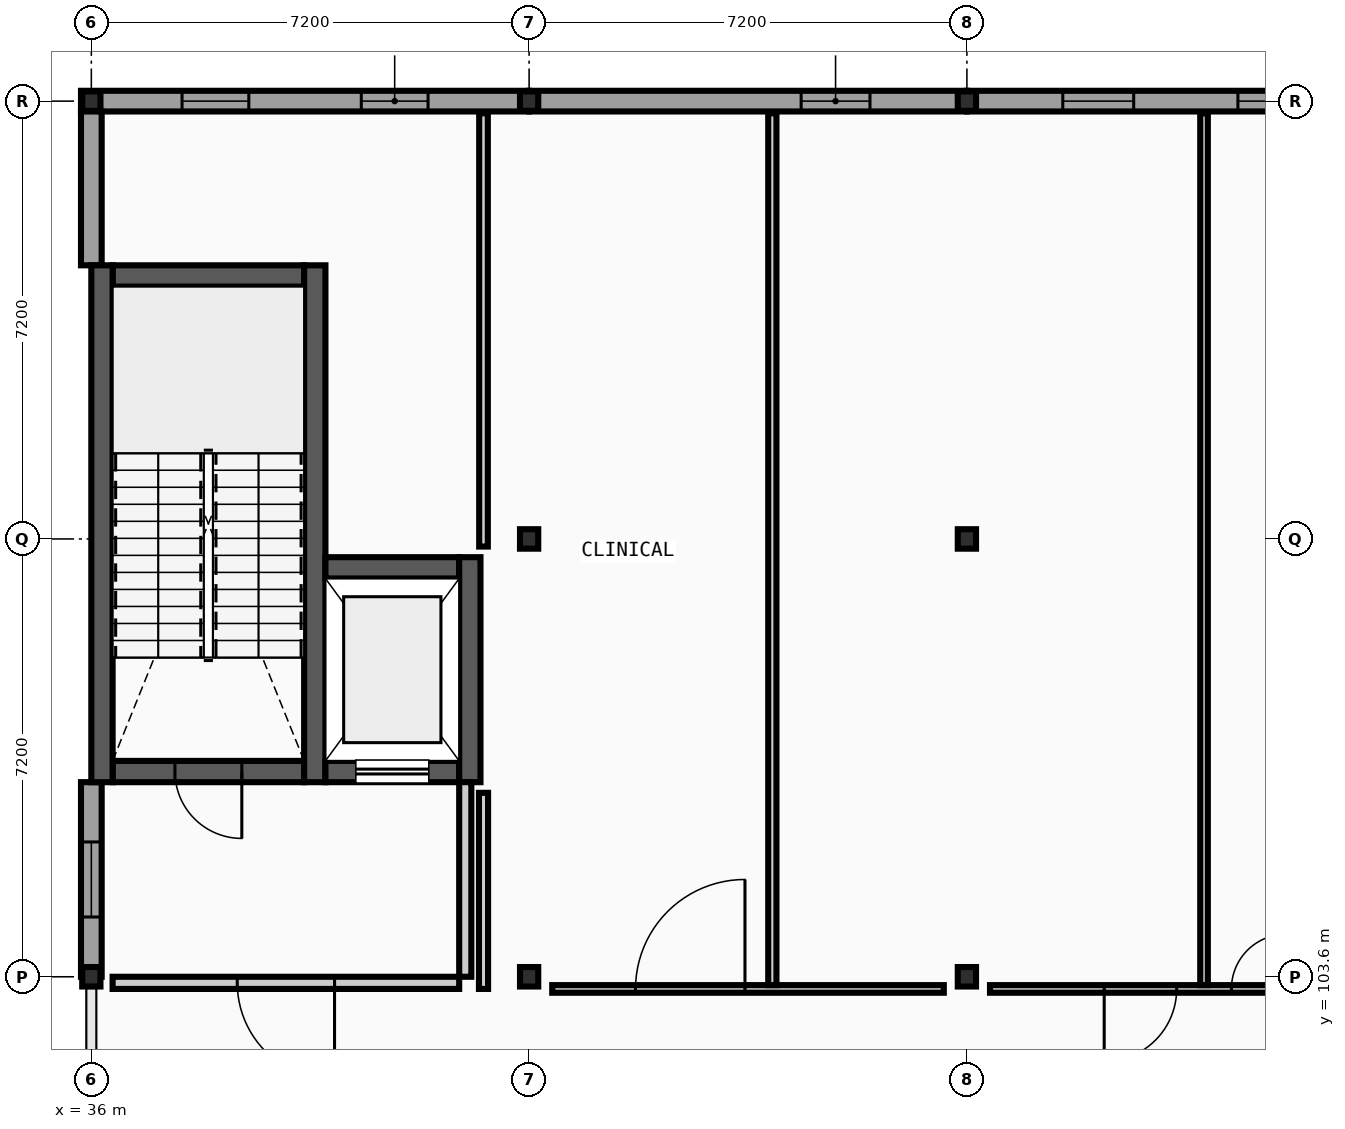
"""IFC4 building model, lengths in metres.
Left out: names, types, materials, properties, quantities, classifications, styles, units other than length and angle.
Written with IfcOpenShell. Run it as: python <this file> out.ifc"""

import sys

from ifc_helpers import new_model, si_unit, direction, frame, frame_2d, origin, origin_2d, place, context, subcontext, project, spatial, rectangle, i_section, extrude, element, fill, save


model = new_model("IFC4")
c1 = context("Model", 3, precision=1e-05, world=origin(), true_north=direction((0.0, 1.0)))
c2 = subcontext(c1, "Body", "Model", "MODEL_VIEW")
j1 = project(units=[si_unit("LENGTHUNIT", "METRE"), si_unit("PLANEANGLEUNIT", "RADIAN")], contexts=[c1])
p1 = place(None, origin())
s1 = spatial("IfcSite", under=j1, at=p1, CompositionType="ELEMENT")
p2 = place(p1, origin())
s2 = spatial("IfcBuilding", under=s1, at=p2, CompositionType="ELEMENT")
p3 = place(p2, frame((0.0, 0.0, 18.4)))
s3 = spatial("IfcBuildingStorey", under=s2, at=p3, CompositionType="ELEMENT", Elevation=18.4)
for number, where, z_axis, x_axis in (
    (1, (36.0, 103.6, 0.0), (0.0, 0.0, 1.0), (1.0, 0.0, 0.0)),
    (2, (36.0, 118.0, 0.0), (0.0, 0.0, 1.0), (1.0, 0.0, 0.0)),
    (3, (43.2, 103.6, 0.0), (0.0, 0.0, 1.0), (1.0, 0.0, 0.0)),
    (4, (43.2, 110.8, 0.0), (0.0, 0.0, 1.0), (1.0, 0.0, 0.0)),
    (5, (43.2, 118.0, 0.0), (0.0, 0.0, 1.0), (1.0, 0.0, 0.0)),
    (6, (50.4, 103.6, 0.0), (0.0, 0.0, 1.0), (1.0, 0.0, 0.0)),
    (7, (50.4, 110.8, 0.0), (0.0, 0.0, 1.0), (1.0, 0.0, 0.0)),
    (8, (50.4, 118.0, 0.0), (0.0, 0.0, 1.0), (1.0, 0.0, 0.0)),
):
    element("IfcColumn", number, at=place(p3, frame(where, z_axis=z_axis, x_axis=x_axis)), inside=s3, PredefinedType="COLUMN", context=c2, shape_type="SweptSolid", body=[
        extrude(i_section(OverallWidth=0.3, OverallDepth=0.32, WebThickness=0.011, FlangeThickness=0.021, FilletRadius=0.027, at=origin_2d()), origin(), (0.0, 0.0, 1.0), 4.4),
    ])
p4 = place(p3, frame((43.2, 118.0, 0.0), z_axis=(0.0, 0.0, 1.0), x_axis=(-1.0, 0.0, 0.0)))
e9 = element("IfcWall", 9, at=p4, inside=s3, PredefinedType="STANDARD", context=c2, shape_type="SweptSolid", body=[
    extrude(rectangle(XDim=7.37, YDim=0.34, at=frame_2d((3.685, 0.0))), origin(), (0.0, 0.0, 1.0), 3.95),
])
p5 = place(p4, frame((1.662, 0.0, 0.95)))
e10 = element("IfcOpeningElement", 10, at=p5, cuts=e9, PredefinedType="OPENING", context=c2, shape_type="SweptSolid", body=[
    extrude(rectangle(XDim=1.098, YDim=1.26, at=frame_2d((0.549, 0.63))), frame((0.0, 0.18, 0.0), z_axis=(0.0, -1.0, 0.0), x_axis=(1.0, 0.0, 0.0)), (0.0, 0.0, 1.0), 0.36),
])
p6 = place(p4, frame((4.61, 0.0, 0.95)))
e11 = element("IfcOpeningElement", 11, at=p6, cuts=e9, PredefinedType="OPENING", context=c2, shape_type="SweptSolid", body=[
    extrude(rectangle(XDim=1.098, YDim=1.26, at=frame_2d((0.549, 0.63))), frame((0.0, 0.18, 0.0), z_axis=(0.0, -1.0, 0.0), x_axis=(1.0, 0.0, 0.0)), (0.0, 0.0, 1.0), 0.36),
])
p7 = place(p3, frame((50.4, 118.0, 0.0), z_axis=(0.0, 0.0, 1.0), x_axis=(-1.0, 0.0, 0.0)))
e12 = element("IfcWall", 12, at=p7, inside=s3, PredefinedType="STANDARD", context=c2, shape_type="SweptSolid", body=[
    extrude(rectangle(XDim=7.2, YDim=0.34, at=frame_2d((3.6, 0.0))), origin(), (0.0, 0.0, 1.0), 3.95),
])
p8 = place(p7, frame((1.594, 0.0, 0.95)))
e13 = element("IfcOpeningElement", 13, at=p8, cuts=e12, PredefinedType="OPENING", context=c2, shape_type="SweptSolid", body=[
    extrude(rectangle(XDim=1.132, YDim=1.26, at=frame_2d((0.566, 0.63))), frame((0.0, 0.18, 0.0), z_axis=(0.0, -1.0, 0.0), x_axis=(1.0, 0.0, 0.0)), (0.0, 0.0, 1.0), 0.36),
])
p9 = place(p3, frame((57.6, 118.0, 0.0), z_axis=(0.0, 0.0, 1.0), x_axis=(-1.0, 0.0, 0.0)))
e14 = element("IfcWall", 14, at=p9, inside=s3, PredefinedType="STANDARD", context=c2, shape_type="SweptSolid", body=[
    extrude(rectangle(XDim=7.2, YDim=0.34, at=frame_2d((3.6, 0.0))), origin(), (0.0, 0.0, 1.0), 3.95),
])
p10 = place(p9, frame((1.577, 0.0, 0.95)))
e15 = element("IfcOpeningElement", 15, at=p10, cuts=e14, PredefinedType="OPENING", context=c2, shape_type="SweptSolid", body=[
    extrude(rectangle(XDim=1.166, YDim=1.26, at=frame_2d((0.583, 0.63))), frame((0.0, 0.18, 0.0), z_axis=(0.0, -1.0, 0.0), x_axis=(1.0, 0.0, 0.0)), (0.0, 0.0, 1.0), 0.36),
])
p11 = place(p9, frame((4.457, 0.0, 0.95)))
e16 = element("IfcOpeningElement", 16, at=p11, cuts=e14, PredefinedType="OPENING", context=c2, shape_type="SweptSolid", body=[
    extrude(rectangle(XDim=1.166, YDim=1.26, at=frame_2d((0.583, 0.63))), frame((0.0, 0.18, 0.0), z_axis=(0.0, -1.0, 0.0), x_axis=(1.0, 0.0, 0.0)), (0.0, 0.0, 1.0), 0.36),
])
p12 = place(p3, frame((36.0, 106.8, 0.0), z_axis=(0.0, 0.0, 1.0), x_axis=(0.0, -1.0, 0.0)))
e17 = element("IfcWall", 17, at=p12, inside=s3, PredefinedType="STANDARD", context=c2, shape_type="SweptSolid", body=[
    extrude(rectangle(XDim=3.2, YDim=0.34, at=frame_2d((1.6, 0.0))), origin(), (0.0, 0.0, 1.0), 4.215),
])
p13 = place(p12, frame((0.983, 0.0, 0.95)))
e18 = element("IfcOpeningElement", 18, at=p13, cuts=e17, PredefinedType="OPENING", context=c2, shape_type="SweptSolid", body=[
    extrude(rectangle(XDim=1.234, YDim=1.26, at=frame_2d((0.617, 0.63))), frame((0.0, 0.18, 0.0), z_axis=(0.0, -1.0, 0.0), x_axis=(1.0, 0.0, 0.0)), (0.0, 0.0, 1.0), 0.36),
])
p14 = place(p3, frame((36.0, 117.83, 0.0), z_axis=(0.0, 0.0, 1.0), x_axis=(0.0, -1.0, 0.0)))
e19 = element("IfcWall", 19, at=p14, inside=s3, PredefinedType="STANDARD", context=c2, shape_type="SweptSolid", body=[
    extrude(rectangle(XDim=2.53, YDim=0.34, at=frame_2d((1.265, 0.0))), origin(), (0.0, 0.0, 1.0), 4.215),
])
p15 = place(p3, frame((36.35, 106.975, 0.0), z_axis=(0.0, 0.0, 1.0), x_axis=(1.0, 0.0, 0.0)))
e20 = element("IfcWall", 20, at=p15, inside=s3, PredefinedType="SHEAR", context=c2, shape_type="SweptSolid", body=[
    extrude(rectangle(XDim=3.15, YDim=0.35, at=frame_2d((1.575, 0.0))), origin(), (0.0, 0.0, 1.0), 4.215),
])
p16 = place(p15, frame((1.025, 0.0, 0.0)))
e21 = element("IfcOpeningElement", 21, at=p16, cuts=e20, PredefinedType="OPENING", context=c2, shape_type="SweptSolid", body=[
    extrude(rectangle(XDim=1.1, YDim=2.15, at=frame_2d((0.55, 1.075))), frame((0.0, 0.185, 0.0), z_axis=(0.0, -1.0, 0.0), x_axis=(1.0, 0.0, 0.0)), (0.0, 0.0, 1.0), 0.37),
])
p17 = place(p3, frame((36.35, 115.125, 0.0), z_axis=(0.0, 0.0, 1.0), x_axis=(1.0, 0.0, 0.0)))
e22 = element("IfcWall", 22, at=p17, inside=s3, PredefinedType="SHEAR", context=c2, shape_type="SweptSolid", body=[
    extrude(rectangle(XDim=3.15, YDim=0.35, at=frame_2d((1.575, 0.0))), origin(), (0.0, 0.0, 1.0), 4.215),
])
for number, where, z_axis, x_axis in (
    (23, (36.175, 106.8, 0.0), (0.0, 0.0, 1.0), (0.0, 1.0, 0.0)),
    (24, (39.675, 106.8, 0.0), (0.0, 0.0, 1.0), (0.0, 1.0, 0.0)),
):
    element("IfcWall", number, at=place(p3, frame(where, z_axis=z_axis, x_axis=x_axis)), inside=s3, PredefinedType="SHEAR", context=c2, shape_type="SweptSolid", body=[
        extrude(rectangle(XDim=8.5, YDim=0.35, at=frame_2d((4.25, 0.0))), origin(), (0.0, 0.0, 1.0), 4.215),
    ])
p18 = place(p3, frame((39.85, 106.975, 0.0), z_axis=(0.0, 0.0, 1.0), x_axis=(1.0, 0.0, 0.0)))
e25 = element("IfcWall", 25, at=p18, inside=s3, PredefinedType="SHEAR", context=c2, shape_type="SweptSolid", body=[
    extrude(rectangle(XDim=2.2, YDim=0.35, at=frame_2d((1.1, 0.0))), origin(), (0.0, 0.0, 1.0), 4.215),
])
p19 = place(p18, frame((0.5, 0.0, 0.0)))
e26 = element("IfcOpeningElement", 26, at=p19, cuts=e25, PredefinedType="OPENING", context=c2, shape_type="SweptSolid", body=[
    extrude(rectangle(XDim=1.2, YDim=2.2, at=frame_2d((0.6, 1.1))), frame((0.0, 0.185, 0.0), z_axis=(0.0, -1.0, 0.0), x_axis=(1.0, 0.0, 0.0)), (0.0, 0.0, 1.0), 0.37),
])
p20 = place(p3, frame((39.85, 110.325, 0.0), z_axis=(0.0, 0.0, 1.0), x_axis=(1.0, 0.0, 0.0)))
e27 = element("IfcWall", 27, at=p20, inside=s3, PredefinedType="SHEAR", context=c2, shape_type="SweptSolid", body=[
    extrude(rectangle(XDim=2.2, YDim=0.35, at=frame_2d((1.1, 0.0))), origin(), (0.0, 0.0, 1.0), 4.215),
])
p21 = place(p3, frame((42.225, 106.8, 0.0), z_axis=(0.0, 0.0, 1.0), x_axis=(0.0, 1.0, 0.0)))
e28 = element("IfcWall", 28, at=p21, inside=s3, PredefinedType="SHEAR", context=c2, shape_type="SweptSolid", body=[
    extrude(rectangle(XDim=3.7, YDim=0.35, at=frame_2d((1.85, 0.0))), origin(), (0.0, 0.0, 1.0), 4.215),
])
p22 = place(p3, frame((36.35, 103.5, 0.0), z_axis=(0.0, 0.0, 1.0), x_axis=(1.0, 0.0, 0.0)))
e29 = element("IfcWall", 29, at=p22, inside=s3, PredefinedType="PARTITIONING", context=c2, shape_type="SweptSolid", body=[
    extrude(rectangle(XDim=5.7, YDim=0.2, at=frame_2d((2.85, 0.0))), origin(), (0.0, 0.0, 1.0), 3.95),
])
p23 = place(p22, frame((2.05, 0.0, 0.0)))
e30 = element("IfcOpeningElement", 30, at=p23, cuts=e29, PredefinedType="OPENING", context=c2, shape_type="SweptSolid", body=[
    extrude(rectangle(XDim=1.6, YDim=2.2, at=frame_2d((0.8, 1.1))), frame((0.0, 0.11, 0.0), z_axis=(0.0, -1.0, 0.0), x_axis=(1.0, 0.0, 0.0)), (0.0, 0.0, 1.0), 0.22),
])
p24 = place(p3, frame((42.15, 103.6, 0.0), z_axis=(0.0, 0.0, 1.0), x_axis=(0.0, 1.0, 0.0)))
e31 = element("IfcWall", 31, at=p24, inside=s3, PredefinedType="PARTITIONING", context=c2, shape_type="SweptSolid", body=[
    extrude(rectangle(XDim=3.2, YDim=0.2, at=frame_2d((1.6, 0.0))), origin(), (0.0, 0.0, 1.0), 4.215),
])
p25 = place(p3, frame((43.58, 103.4, 0.0), z_axis=(0.0, 0.0, 1.0), x_axis=(1.0, 0.0, 0.0)))
e32 = element("IfcWall", 32, at=p25, inside=s3, PredefinedType="PARTITIONING", context=c2, shape_type="SweptSolid", body=[
    extrude(rectangle(XDim=6.44, YDim=0.125, at=frame_2d((3.22, 0.0))), origin(), (0.0, 0.0, 1.0), 3.95),
])
p26 = place(p25, frame((1.37, 0.0, 0.0)))
e33 = element("IfcOpeningElement", 33, at=p26, cuts=e32, PredefinedType="OPENING", context=c2, shape_type="SweptSolid", body=[
    extrude(rectangle(XDim=1.8, YDim=2.3, at=frame_2d((0.9, 1.15))), frame((0.0, 0.073, 0.0), z_axis=(0.0, -1.0, 0.0), x_axis=(1.0, 0.0, 0.0)), (0.0, 0.0, 1.0), 0.145),
])
p27 = place(p3, frame((50.78, 103.4, 0.0), z_axis=(0.0, 0.0, 1.0), x_axis=(1.0, 0.0, 0.0)))
e34 = element("IfcWall", 34, at=p27, inside=s3, PredefinedType="PARTITIONING", context=c2, shape_type="SweptSolid", body=[
    extrude(rectangle(XDim=6.44, YDim=0.125, at=frame_2d((3.22, 0.0))), origin(), (0.0, 0.0, 1.0), 3.95),
])
p28 = place(p27, frame((3.97, 0.0, 0.0)))
e35 = element("IfcOpeningElement", 35, at=p28, cuts=e34, PredefinedType="OPENING", context=c2, shape_type="SweptSolid", body=[
    extrude(rectangle(XDim=0.9, YDim=2.1, at=frame_2d((0.45, 1.05))), frame((0.0, 0.073, 0.0), z_axis=(0.0, -1.0, 0.0), x_axis=(1.0, 0.0, 0.0)), (0.0, 0.0, 1.0), 0.145),
])
p29 = place(p27, frame((1.878, 0.0, 0.0)))
e36 = element("IfcOpeningElement", 36, at=p29, cuts=e34, PredefinedType="OPENING", context=c2, shape_type="SweptSolid", body=[
    extrude(rectangle(XDim=1.192, YDim=2.068, at=frame_2d((0.596, 1.034))), frame((0.0, 0.073, 0.0), z_axis=(0.0, -1.0, 0.0), x_axis=(1.0, 0.0, 0.0)), (0.0, 0.0, 1.0), 0.145),
])
p30 = place(p3, frame((42.45, 103.4, 0.0), z_axis=(0.0, 0.0, 1.0), x_axis=(0.0, 1.0, 0.0)))
e37 = element("IfcWall", 37, at=p30, inside=s3, PredefinedType="PARTITIONING", context=c2, shape_type="SweptSolid", body=[
    extrude(rectangle(XDim=3.225, YDim=0.15, at=frame_2d((1.613, 0.0))), origin(), (0.0, 0.0, 1.0), 4.215),
])
p31 = place(p3, frame((42.45, 110.675, 0.0), z_axis=(0.0, 0.0, 1.0), x_axis=(0.0, 1.0, 0.0)))
e38 = element("IfcWall", 38, at=p31, inside=s3, PredefinedType="PARTITIONING", context=c2, shape_type="SweptSolid", body=[
    extrude(rectangle(XDim=7.125, YDim=0.142, at=frame_2d((3.562, 0.0))), origin(), (0.0, 0.0, 1.0), 4.215),
])
p32 = place(p3, frame((47.2, 103.462, 0.0), z_axis=(0.0, 0.0, 1.0), x_axis=(0.0, 1.0, 0.0)))
e39 = element("IfcWall", 39, at=p32, inside=s3, PredefinedType="PARTITIONING", context=c2, shape_type="SweptSolid", body=[
    extrude(rectangle(XDim=14.338, YDim=0.135, at=frame_2d((7.169, 0.0))), origin(), (0.0, 0.0, 1.0), 4.215),
])
p33 = place(p3, frame((54.3, 103.462, 0.0), z_axis=(0.0, 0.0, 1.0), x_axis=(0.0, 1.0, 0.0)))
e40 = element("IfcWall", 40, at=p33, inside=s3, PredefinedType="PARTITIONING", context=c2, shape_type="SweptSolid", body=[
    extrude(rectangle(XDim=14.338, YDim=0.125, at=frame_2d((7.169, 0.0))), origin(), (0.0, 0.0, 1.0), 4.215),
])
p34 = place(p5, origin())
e41 = element("IfcWindow", 41, at=p34, inside=s3, PartitioningType="SINGLE_PANEL", PredefinedType="WINDOW", context=c2, shape_type="SweptSolid", body=[
    extrude(rectangle(XDim=1.098, YDim=1.26, at=frame_2d((0.549, 0.63))), frame((0.0, 0.03, 0.0), z_axis=(0.0, -1.0, 0.0), x_axis=(1.0, 0.0, 0.0)), (0.0, 0.0, 1.0), 0.06),
])
fill(e10, e41)
p35 = place(p6, origin())
e42 = element("IfcWindow", 42, at=p35, inside=s3, PartitioningType="SINGLE_PANEL", PredefinedType="WINDOW", context=c2, shape_type="SweptSolid", body=[
    extrude(rectangle(XDim=1.098, YDim=1.26, at=frame_2d((0.549, 0.63))), frame((0.0, 0.03, 0.0), z_axis=(0.0, -1.0, 0.0), x_axis=(1.0, 0.0, 0.0)), (0.0, 0.0, 1.0), 0.06),
])
fill(e11, e42)
p36 = place(p8, origin())
e43 = element("IfcWindow", 43, at=p36, inside=s3, PartitioningType="SINGLE_PANEL", PredefinedType="WINDOW", context=c2, shape_type="SweptSolid", body=[
    extrude(rectangle(XDim=1.132, YDim=1.26, at=frame_2d((0.566, 0.63))), frame((0.0, 0.03, 0.0), z_axis=(0.0, -1.0, 0.0), x_axis=(1.0, 0.0, 0.0)), (0.0, 0.0, 1.0), 0.06),
])
fill(e13, e43)
p37 = place(p10, origin())
e44 = element("IfcWindow", 44, at=p37, inside=s3, PartitioningType="SINGLE_PANEL", PredefinedType="WINDOW", context=c2, shape_type="SweptSolid", body=[
    extrude(rectangle(XDim=1.166, YDim=1.26, at=frame_2d((0.583, 0.63))), frame((0.0, 0.03, 0.0), z_axis=(0.0, -1.0, 0.0), x_axis=(1.0, 0.0, 0.0)), (0.0, 0.0, 1.0), 0.06),
])
fill(e15, e44)
p38 = place(p11, origin())
e45 = element("IfcWindow", 45, at=p38, inside=s3, PartitioningType="SINGLE_PANEL", PredefinedType="WINDOW", context=c2, shape_type="SweptSolid", body=[
    extrude(rectangle(XDim=1.166, YDim=1.26, at=frame_2d((0.583, 0.63))), frame((0.0, 0.03, 0.0), z_axis=(0.0, -1.0, 0.0), x_axis=(1.0, 0.0, 0.0)), (0.0, 0.0, 1.0), 0.06),
])
fill(e16, e45)
p39 = place(p13, origin())
e46 = element("IfcWindow", 46, at=p39, inside=s3, PartitioningType="SINGLE_PANEL", PredefinedType="WINDOW", context=c2, shape_type="SweptSolid", body=[
    extrude(rectangle(XDim=1.234, YDim=1.26, at=frame_2d((0.617, 0.63))), frame((0.0, 0.03, 0.0), z_axis=(0.0, -1.0, 0.0), x_axis=(1.0, 0.0, 0.0)), (0.0, 0.0, 1.0), 0.06),
])
fill(e18, e46)
p40 = place(p16, origin())
e47 = element("IfcDoor", 47, at=p40, inside=s3, OperationType="SINGLE_SWING_RIGHT", PredefinedType="DOOR", context=c2, shape_type="SweptSolid", body=[
    extrude(rectangle(XDim=1.1, YDim=2.15, at=frame_2d((0.55, 1.075))), frame((0.0, 0.025, 0.0), z_axis=(0.0, -1.0, 0.0), x_axis=(1.0, 0.0, 0.0)), (0.0, 0.0, 1.0), 0.05),
])
fill(e21, e47)
p41 = place(p19, origin())
e48 = element("IfcDoor", 48, at=p41, inside=s3, OperationType="SLIDING_TO_RIGHT", PredefinedType="DOOR", context=c2, shape_type="SweptSolid", body=[
    extrude(rectangle(XDim=1.2, YDim=2.2, at=frame_2d((0.6, 1.1))), frame((0.0, 0.025, 0.0), z_axis=(0.0, -1.0, 0.0), x_axis=(1.0, 0.0, 0.0)), (0.0, 0.0, 1.0), 0.05),
])
fill(e26, e48)
p42 = place(p23, origin())
e49 = element("IfcDoor", 49, at=p42, inside=s3, OperationType="DOUBLE_DOOR_SINGLE_SWING", PredefinedType="DOOR", context=c2, shape_type="SweptSolid", body=[
    extrude(rectangle(XDim=1.6, YDim=2.2, at=frame_2d((0.8, 1.1))), frame((0.0, 0.025, 0.0), z_axis=(0.0, -1.0, 0.0), x_axis=(1.0, 0.0, 0.0)), (0.0, 0.0, 1.0), 0.05),
])
fill(e30, e49)
p43 = place(p28, frame((0.9, 0.0, 0.0), z_axis=(0.0, 0.0, 1.0), x_axis=(-1.0, 0.0, 0.0)))
e50 = element("IfcDoor", 50, at=p43, inside=s3, OperationType="SINGLE_SWING_RIGHT", PredefinedType="DOOR", context=c2, shape_type="SweptSolid", body=[
    extrude(rectangle(XDim=0.9, YDim=2.1, at=frame_2d((0.45, 1.05))), frame((0.0, 0.025, 0.0), z_axis=(0.0, -1.0, 0.0), x_axis=(1.0, 0.0, 0.0)), (0.0, 0.0, 1.0), 0.05),
])
fill(e35, e50)
p44 = place(p26, frame((1.8, 0.0, 0.0), z_axis=(0.0, 0.0, 1.0), x_axis=(-1.0, 0.0, 0.0)))
e51 = element("IfcDoor", 51, at=p44, inside=s3, OperationType="DOUBLE_DOOR_SINGLE_SWING", PredefinedType="DOOR", context=c2, shape_type="SweptSolid", body=[
    extrude(rectangle(XDim=1.8, YDim=2.3, at=frame_2d((0.9, 1.15))), frame((0.0, 0.025, 0.0), z_axis=(0.0, -1.0, 0.0), x_axis=(1.0, 0.0, 0.0)), (0.0, 0.0, 1.0), 0.05),
])
fill(e33, e51)
p45 = place(p29, frame((1.192, 0.0, 0.0), z_axis=(0.0, 0.0, 1.0), x_axis=(-1.0, 0.0, 0.0)))
e52 = element("IfcDoor", 52, at=p45, inside=s3, OperationType="SINGLE_SWING_LEFT", PredefinedType="DOOR", context=c2, shape_type="SweptSolid", body=[
    extrude(rectangle(XDim=1.192, YDim=2.068, at=frame_2d((0.596, 1.034))), frame((0.0, 0.025, 0.0), z_axis=(0.0, -1.0, 0.0), x_axis=(1.0, 0.0, 0.0)), (0.0, 0.0, 1.0), 0.05),
])
fill(e36, e52)
save(model, sys.argv[1])
